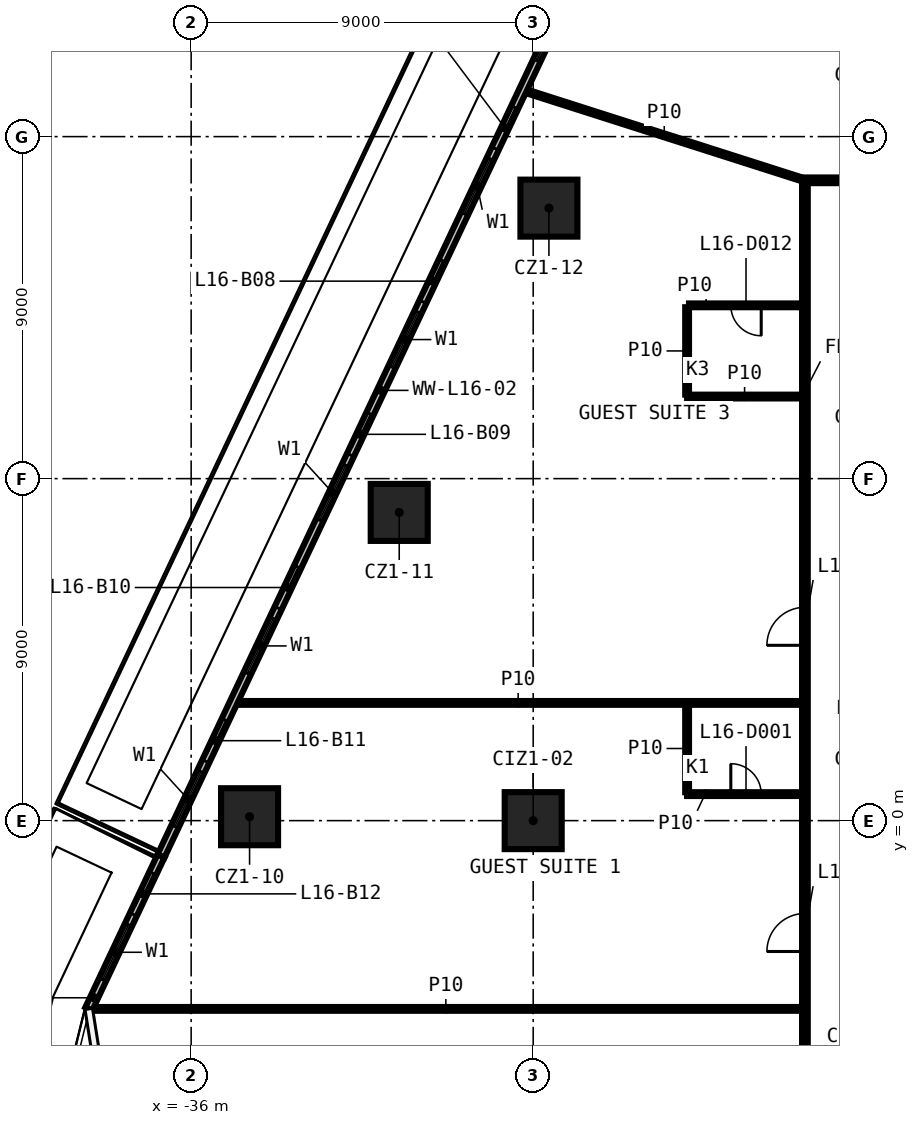
"""IFC4 building model, lengths in metres.
Left out: names, types, materials, properties, quantities, classifications, styles, units other than length and angle.
Written with IfcOpenShell. Run it as: python <this file> out.ifc"""

import sys

from ifc_helpers import new_model, si_unit, direction, frame, frame_2d, origin, origin_2d, place, context, subcontext, project, spatial, rectangle, extrude, element, fill, save


model = new_model("IFC4")
c1 = context("Model", 3, precision=1e-05, world=origin(), true_north=direction((0.0, 1.0)))
c2 = subcontext(c1, "Body", "Model", "MODEL_VIEW")
j1 = project(units=[si_unit("LENGTHUNIT", "METRE"), si_unit("PLANEANGLEUNIT", "RADIAN")], contexts=[c1])
p1 = place(None, origin())
s1 = spatial("IfcSite", under=j1, at=p1, CompositionType="ELEMENT")
p2 = place(p1, origin())
s2 = spatial("IfcBuilding", under=s1, at=p2, CompositionType="ELEMENT")
p3 = place(p2, frame((0.0, 0.0, 81.0)))
s3 = spatial("IfcBuildingStorey", under=s2, at=p3, CompositionType="ELEMENT", Elevation=81.0)
for number, where, z_axis, x_axis in (
    (1, (-34.463, 0.103, 0.0), (0.0, 0.0, 1.0), (1.0, 0.0, 0.0)),
    (2, (-30.525, 8.111, 0.0), (0.0, 0.0, 1.0), (1.0, 0.0, 0.0)),
    (3, (-26.586, 16.118, 0.0), (0.0, 0.0, 1.0), (1.0, 0.0, 0.0)),
    (4, (-27.0, 0.0, 0.0), (0.0, 0.0, 1.0), (1.0, 0.0, 0.0)),
):
    element("IfcColumn", number, at=place(p3, frame(where, z_axis=z_axis, x_axis=x_axis)), inside=s3, PredefinedType="COLUMN", context=c2, shape_type="SweptSolid", body=[
        extrude(rectangle(XDim=1.5, YDim=1.5, at=origin_2d()), origin(), (0.0, 0.0, 1.0), 3.3),
    ])
p4 = place(p3, frame((-38.672, -4.954, 0.0), z_axis=(0.0, 0.0, 1.0), x_axis=(1.0, 0.0, 0.0)))
e5 = element("IfcWall", 5, at=p4, inside=s3, PredefinedType="PARTITIONING", context=c2, shape_type="SweptSolid", body=[
    extrude(rectangle(XDim=18.747, YDim=0.1, at=frame_2d((9.374, 0.0))), origin(), (0.0, 0.0, 1.0), 3.3),
])
p5 = place(p3, frame((-22.95, 0.698, 0.0), z_axis=(0.0, 0.0, 1.0), x_axis=(1.0, 0.0, 0.0)))
e6 = element("IfcWall", 6, at=p5, inside=s3, PredefinedType="PARTITIONING", context=c2, shape_type="SweptSolid", body=[
    extrude(rectangle(XDim=3.025, YDim=0.1, at=frame_2d((1.512, 0.0))), origin(), (0.0, 0.0, 1.0), 3.3),
])
p6 = place(p5, frame((1.15, 0.0, 0.0)))
e7 = element("IfcOpeningElement", 7, at=p6, cuts=e6, PredefinedType="OPENING", context=c2, shape_type="SweptSolid", body=[
    extrude(rectangle(XDim=0.8, YDim=2.1, at=frame_2d((0.4, 1.05))), frame((0.0, 0.06, 0.0), z_axis=(0.0, -1.0, 0.0), x_axis=(1.0, 0.0, 0.0)), (0.0, 0.0, 1.0), 0.12),
])
p7 = place(p3, frame((-34.868, 3.098, 0.0), z_axis=(0.0, 0.0, 1.0), x_axis=(1.0, 0.0, 0.0)))
e8 = element("IfcWall", 8, at=p7, inside=s3, PredefinedType="PARTITIONING", context=c2, shape_type="SweptSolid", body=[
    extrude(rectangle(XDim=14.943, YDim=0.1, at=frame_2d((7.471, 0.0))), origin(), (0.0, 0.0, 1.0), 3.3),
])
p8 = place(p3, frame((-22.95, 11.16, 0.0), z_axis=(0.0, 0.0, 1.0), x_axis=(1.0, 0.0, 0.0)))
e9 = element("IfcWall", 9, at=p8, inside=s3, PredefinedType="PARTITIONING", context=c2, shape_type="SweptSolid", body=[
    extrude(rectangle(XDim=3.025, YDim=0.1, at=frame_2d((1.512, 0.0))), origin(), (0.0, 0.0, 1.0), 3.3),
])
p9 = place(p3, frame((-19.925, 13.56, 0.0), z_axis=(0.0, 0.0, 1.0), x_axis=(-1.0, 0.0, 0.0)))
e10 = element("IfcWall", 10, at=p9, inside=s3, PredefinedType="PARTITIONING", context=c2, shape_type="SweptSolid", body=[
    extrude(rectangle(XDim=2.975, YDim=0.1, at=frame_2d((1.487, 0.0))), origin(), (0.0, 0.0, 1.0), 3.3),
])
p10 = place(p9, frame((1.075, 0.0, 0.0)))
e11 = element("IfcOpeningElement", 11, at=p10, cuts=e10, PredefinedType="OPENING", context=c2, shape_type="SweptSolid", body=[
    extrude(rectangle(XDim=0.8, YDim=2.1, at=frame_2d((0.4, 1.05))), frame((0.0, 0.06, 0.0), z_axis=(0.0, -1.0, 0.0), x_axis=(1.0, 0.0, 0.0)), (0.0, 0.0, 1.0), 0.12),
])
p11 = place(p3, frame((-19.925, 16.85, 0.0), z_axis=(0.0, 0.0, 1.0), x_axis=(1.0, 0.0, 0.0)))
e12 = element("IfcWall", 12, at=p11, inside=s3, PredefinedType="PARTITIONING", context=c2, shape_type="SweptSolid", body=[
    extrude(rectangle(XDim=39.85, YDim=0.15, at=frame_2d((19.925, 0.0))), origin(), (0.0, 0.0, 1.0), 3.3),
])
p12 = place(p11, frame((31.667, 0.0, 0.0)))
e13 = element("IfcOpeningElement", 13, at=p12, cuts=e12, PredefinedType="OPENING", context=c2, shape_type="SweptSolid", body=[
    extrude(rectangle(XDim=0.9, YDim=2.1, at=frame_2d((0.45, 1.05))), frame((0.0, 0.085, 0.0), z_axis=(0.0, -1.0, 0.0), x_axis=(1.0, 0.0, 0.0)), (0.0, 0.0, 1.0), 0.17),
])
p13 = place(p11, frame((13.656, 0.0, 0.0)))
e14 = element("IfcOpeningElement", 14, at=p13, cuts=e12, PredefinedType="OPENING", context=c2, shape_type="SweptSolid", body=[
    extrude(rectangle(XDim=0.9, YDim=2.1, at=frame_2d((0.45, 1.05))), frame((0.0, 0.085, 0.0), z_axis=(0.0, -1.0, 0.0), x_axis=(1.0, 0.0, 0.0)), (0.0, 0.0, 1.0), 0.17),
])
p14 = place(p3, frame((-19.85, -16.775, 0.0), z_axis=(0.0, 0.0, 1.0), x_axis=(0.0, 1.0, 0.0)))
e15 = element("IfcWall", 15, at=p14, inside=s3, PredefinedType="PARTITIONING", context=c2, shape_type="SweptSolid", body=[
    extrude(rectangle(XDim=33.55, YDim=0.15, at=frame_2d((16.775, 0.0))), origin(), (0.0, 0.0, 1.0), 3.3),
])
p15 = place(p14, frame((13.332, 0.0, 0.0)))
e16 = element("IfcOpeningElement", 16, at=p15, cuts=e15, PredefinedType="OPENING", context=c2, shape_type="SweptSolid", body=[
    extrude(rectangle(XDim=1.0, YDim=2.1, at=frame_2d((0.5, 1.05))), frame((0.0, 0.085, 0.0), z_axis=(0.0, -1.0, 0.0), x_axis=(1.0, 0.0, 0.0)), (0.0, 0.0, 1.0), 0.17),
])
p16 = place(p14, frame((4.207, 0.0, 0.0)))
e17 = element("IfcOpeningElement", 17, at=p16, cuts=e15, PredefinedType="OPENING", context=c2, shape_type="SweptSolid", body=[
    extrude(rectangle(XDim=0.9, YDim=2.1, at=frame_2d((0.45, 1.05))), frame((0.0, 0.085, 0.0), z_axis=(0.0, -1.0, 0.0), x_axis=(1.0, 0.0, 0.0)), (0.0, 0.0, 1.0), 0.17),
])
p17 = place(p14, frame((21.389, 0.0, 0.0)))
e18 = element("IfcOpeningElement", 18, at=p17, cuts=e15, PredefinedType="OPENING", context=c2, shape_type="SweptSolid", body=[
    extrude(rectangle(XDim=1.0, YDim=2.1, at=frame_2d((0.5, 1.05))), frame((0.0, 0.085, 0.0), z_axis=(0.0, -1.0, 0.0), x_axis=(1.0, 0.0, 0.0)), (0.0, 0.0, 1.0), 0.17),
])
p18 = place(p3, frame((-22.95, 0.748, 0.0), z_axis=(0.0, 0.0, 1.0), x_axis=(0.0, 1.0, 0.0)))
e19 = element("IfcWall", 19, at=p18, inside=s3, PredefinedType="PARTITIONING", context=c2, shape_type="SweptSolid", body=[
    extrude(rectangle(XDim=2.3, YDim=0.1, at=frame_2d((1.15, 0.0))), origin(), (0.0, 0.0, 1.0), 3.3),
])
p19 = place(p3, frame((-22.95, 11.21, 0.0), z_axis=(0.0, 0.0, 1.0), x_axis=(0.0, 1.0, 0.0)))
e20 = element("IfcWall", 20, at=p19, inside=s3, PredefinedType="PARTITIONING", context=c2, shape_type="SweptSolid", body=[
    extrude(rectangle(XDim=2.3, YDim=0.1, at=frame_2d((1.15, 0.0))), origin(), (0.0, 0.0, 1.0), 3.3),
])
p20 = place(p3, frame((-27.253, 19.216, 0.0), z_axis=(0.0, 0.0, 1.0), x_axis=(0.952548805098, -0.304385896366, 0.0)))
e21 = element("IfcWall", 21, at=p20, inside=s3, PredefinedType="PARTITIONING", context=c2, shape_type="SweptSolid", body=[
    extrude(rectangle(XDim=7.772, YDim=0.1, at=frame_2d((3.886, 0.0))), origin(), (0.0, 0.0, 1.0), 3.3),
])
p21 = place(p3, frame((-25.368, 23.253, 0.0), z_axis=(0.0, 0.0, 1.0), x_axis=(-0.427150376431, -0.90418059917, 0.0)))
e22 = element("IfcWall", 22, at=p21, inside=s3, PredefinedType="SOLIDWALL", context=c2, shape_type="SweptSolid", body=[
    extrude(rectangle(XDim=26.749, YDim=0.2, at=frame_2d((13.375, 0.0))), origin(), (0.0, 0.0, 1.0), 3.3),
])
p22 = place(p21, frame((2.0, 0.0, 0.6)))
e23 = element("IfcOpeningElement", 23, at=p22, cuts=e22, PredefinedType="OPENING", context=c2, shape_type="SweptSolid", body=[
    extrude(rectangle(XDim=1.6, YDim=2.4, at=frame_2d((0.8, 1.2))), frame((0.0, 0.11, 0.0), z_axis=(0.0, -1.0, 0.0), x_axis=(1.0, 0.0, 0.0)), (0.0, 0.0, 1.0), 0.22),
])
p23 = place(p21, frame((0.5, 0.0, 0.0)))
e24 = element("IfcOpeningElement", 24, at=p23, cuts=e22, PredefinedType="OPENING", context=c2, shape_type="SweptSolid", body=[
    extrude(rectangle(XDim=1.2, YDim=2.4, at=frame_2d((0.6, 1.2))), frame((0.0, 0.11, 0.0), z_axis=(0.0, -1.0, 0.0), x_axis=(1.0, 0.0, 0.0)), (0.0, 0.0, 1.0), 0.22),
])
p24 = place(p21, frame((6.458, 0.0, 0.6)))
e25 = element("IfcOpeningElement", 25, at=p24, cuts=e22, PredefinedType="OPENING", context=c2, shape_type="SweptSolid", body=[
    extrude(rectangle(XDim=1.6, YDim=2.4, at=frame_2d((0.8, 1.2))), frame((0.0, 0.11, 0.0), z_axis=(0.0, -1.0, 0.0), x_axis=(1.0, 0.0, 0.0)), (0.0, 0.0, 1.0), 0.22),
])
p25 = place(p21, frame((4.958, 0.0, 0.0)))
e26 = element("IfcOpeningElement", 26, at=p25, cuts=e22, PredefinedType="OPENING", context=c2, shape_type="SweptSolid", body=[
    extrude(rectangle(XDim=1.2, YDim=2.4, at=frame_2d((0.6, 1.2))), frame((0.0, 0.11, 0.0), z_axis=(0.0, -1.0, 0.0), x_axis=(1.0, 0.0, 0.0)), (0.0, 0.0, 1.0), 0.22),
])
p26 = place(p21, frame((10.916, 0.0, 0.6)))
e27 = element("IfcOpeningElement", 27, at=p26, cuts=e22, PredefinedType="OPENING", context=c2, shape_type="SweptSolid", body=[
    extrude(rectangle(XDim=1.6, YDim=2.4, at=frame_2d((0.8, 1.2))), frame((0.0, 0.11, 0.0), z_axis=(0.0, -1.0, 0.0), x_axis=(1.0, 0.0, 0.0)), (0.0, 0.0, 1.0), 0.22),
])
p27 = place(p21, frame((9.416, 0.0, 0.0)))
e28 = element("IfcOpeningElement", 28, at=p27, cuts=e22, PredefinedType="OPENING", context=c2, shape_type="SweptSolid", body=[
    extrude(rectangle(XDim=1.2, YDim=2.4, at=frame_2d((0.6, 1.2))), frame((0.0, 0.11, 0.0), z_axis=(0.0, -1.0, 0.0), x_axis=(1.0, 0.0, 0.0)), (0.0, 0.0, 1.0), 0.22),
])
p28 = place(p21, frame((15.374, 0.0, 0.6)))
e29 = element("IfcOpeningElement", 29, at=p28, cuts=e22, PredefinedType="OPENING", context=c2, shape_type="SweptSolid", body=[
    extrude(rectangle(XDim=1.6, YDim=2.4, at=frame_2d((0.8, 1.2))), frame((0.0, 0.11, 0.0), z_axis=(0.0, -1.0, 0.0), x_axis=(1.0, 0.0, 0.0)), (0.0, 0.0, 1.0), 0.22),
])
p29 = place(p21, frame((13.874, 0.0, 0.0)))
e30 = element("IfcOpeningElement", 30, at=p29, cuts=e22, PredefinedType="OPENING", context=c2, shape_type="SweptSolid", body=[
    extrude(rectangle(XDim=1.2, YDim=2.4, at=frame_2d((0.6, 1.2))), frame((0.0, 0.11, 0.0), z_axis=(0.0, -1.0, 0.0), x_axis=(1.0, 0.0, 0.0)), (0.0, 0.0, 1.0), 0.22),
])
p30 = place(p21, frame((19.833, 0.0, 0.6)))
e31 = element("IfcOpeningElement", 31, at=p30, cuts=e22, PredefinedType="OPENING", context=c2, shape_type="SweptSolid", body=[
    extrude(rectangle(XDim=1.6, YDim=2.4, at=frame_2d((0.8, 1.2))), frame((0.0, 0.11, 0.0), z_axis=(0.0, -1.0, 0.0), x_axis=(1.0, 0.0, 0.0)), (0.0, 0.0, 1.0), 0.22),
])
p31 = place(p21, frame((18.333, 0.0, 0.0)))
e32 = element("IfcOpeningElement", 32, at=p31, cuts=e22, PredefinedType="OPENING", context=c2, shape_type="SweptSolid", body=[
    extrude(rectangle(XDim=1.2, YDim=2.4, at=frame_2d((0.6, 1.2))), frame((0.0, 0.11, 0.0), z_axis=(0.0, -1.0, 0.0), x_axis=(1.0, 0.0, 0.0)), (0.0, 0.0, 1.0), 0.22),
])
p32 = place(p21, frame((24.291, 0.0, 0.6)))
e33 = element("IfcOpeningElement", 33, at=p32, cuts=e22, PredefinedType="OPENING", context=c2, shape_type="SweptSolid", body=[
    extrude(rectangle(XDim=1.6, YDim=2.4, at=frame_2d((0.8, 1.2))), frame((0.0, 0.11, 0.0), z_axis=(0.0, -1.0, 0.0), x_axis=(1.0, 0.0, 0.0)), (0.0, 0.0, 1.0), 0.22),
])
p33 = place(p21, frame((22.791, 0.0, 0.0)))
e34 = element("IfcOpeningElement", 34, at=p33, cuts=e22, PredefinedType="OPENING", context=c2, shape_type="SweptSolid", body=[
    extrude(rectangle(XDim=1.2, YDim=2.4, at=frame_2d((0.6, 1.2))), frame((0.0, 0.11, 0.0), z_axis=(0.0, -1.0, 0.0), x_axis=(1.0, 0.0, 0.0)), (0.0, 0.0, 1.0), 0.22),
])
p34 = place(p3, frame((-36.794, -0.933, 0.0), z_axis=(0.0, 0.0, 1.0), x_axis=(-0.427189555154, -0.904162089433, 0.0)))
e35 = element("IfcWall", 35, at=p34, inside=s3, PredefinedType="SOLIDWALL", context=c2, shape_type="SweptSolid", body=[
    extrude(rectangle(XDim=4.448, YDim=0.2, at=frame_2d((2.224, 0.0))), origin(), (0.0, 0.0, 1.0), 3.3),
])
p35 = place(p34, frame((2.0, 0.0, 0.6)))
e36 = element("IfcOpeningElement", 36, at=p35, cuts=e35, PredefinedType="OPENING", context=c2, shape_type="SweptSolid", body=[
    extrude(rectangle(XDim=1.6, YDim=2.4, at=frame_2d((0.8, 1.2))), frame((0.0, 0.11, 0.0), z_axis=(0.0, -1.0, 0.0), x_axis=(1.0, 0.0, 0.0)), (0.0, 0.0, 1.0), 0.22),
])
p36 = place(p34, frame((0.5, 0.0, 0.0)))
e37 = element("IfcOpeningElement", 37, at=p36, cuts=e35, PredefinedType="OPENING", context=c2, shape_type="SweptSolid", body=[
    extrude(rectangle(XDim=1.2, YDim=2.4, at=frame_2d((0.6, 1.2))), frame((0.0, 0.11, 0.0), z_axis=(0.0, -1.0, 0.0), x_axis=(1.0, 0.0, 0.0)), (0.0, 0.0, 1.0), 0.22),
])
p37 = place(p6, origin())
e38 = element("IfcDoor", 38, at=p37, inside=s3, OperationType="SINGLE_SWING_LEFT", PredefinedType="DOOR", context=c2, shape_type="SweptSolid", body=[
    extrude(rectangle(XDim=0.8, YDim=2.1, at=frame_2d((0.4, 1.05))), frame((0.0, 0.025, 0.0), z_axis=(0.0, -1.0, 0.0), x_axis=(1.0, 0.0, 0.0)), (0.0, 0.0, 1.0), 0.05),
])
fill(e7, e38)
p38 = place(p15, origin())
e39 = element("IfcDoor", 39, at=p38, inside=s3, OperationType="SINGLE_SWING_RIGHT", PredefinedType="DOOR", context=c2, shape_type="SweptSolid", body=[
    extrude(rectangle(XDim=1.0, YDim=2.1, at=frame_2d((0.5, 1.05))), frame((0.0, 0.025, 0.0), z_axis=(0.0, -1.0, 0.0), x_axis=(1.0, 0.0, 0.0)), (0.0, 0.0, 1.0), 0.05),
])
fill(e16, e39)
p39 = place(p10, origin())
e40 = element("IfcDoor", 40, at=p39, inside=s3, OperationType="SINGLE_SWING_RIGHT", PredefinedType="DOOR", context=c2, shape_type="SweptSolid", body=[
    extrude(rectangle(XDim=0.8, YDim=2.1, at=frame_2d((0.4, 1.05))), frame((0.0, 0.025, 0.0), z_axis=(0.0, -1.0, 0.0), x_axis=(1.0, 0.0, 0.0)), (0.0, 0.0, 1.0), 0.05),
])
fill(e11, e40)
p40 = place(p17, origin())
e41 = element("IfcDoor", 41, at=p40, inside=s3, OperationType="SINGLE_SWING_LEFT", PredefinedType="DOOR", context=c2, shape_type="SweptSolid", body=[
    extrude(rectangle(XDim=1.0, YDim=2.1, at=frame_2d((0.5, 1.05))), frame((0.0, 0.025, 0.0), z_axis=(0.0, -1.0, 0.0), x_axis=(1.0, 0.0, 0.0)), (0.0, 0.0, 1.0), 0.05),
])
fill(e18, e41)
p41 = place(p22, origin())
e42 = element("IfcWindow", 42, at=p41, inside=s3, PartitioningType="SINGLE_PANEL", PredefinedType="WINDOW", context=c2, shape_type="SweptSolid", body=[
    extrude(rectangle(XDim=1.6, YDim=2.4, at=frame_2d((0.8, 1.2))), frame((0.0, 0.03, 0.0), z_axis=(0.0, -1.0, 0.0), x_axis=(1.0, 0.0, 0.0)), (0.0, 0.0, 1.0), 0.06),
])
fill(e23, e42)
p42 = place(p24, origin())
e43 = element("IfcWindow", 43, at=p42, inside=s3, PartitioningType="SINGLE_PANEL", PredefinedType="WINDOW", context=c2, shape_type="SweptSolid", body=[
    extrude(rectangle(XDim=1.6, YDim=2.4, at=frame_2d((0.8, 1.2))), frame((0.0, 0.03, 0.0), z_axis=(0.0, -1.0, 0.0), x_axis=(1.0, 0.0, 0.0)), (0.0, 0.0, 1.0), 0.06),
])
fill(e25, e43)
p43 = place(p25, origin())
e44 = element("IfcDoor", 44, at=p43, inside=s3, OperationType="SLIDING_TO_LEFT", PredefinedType="DOOR", context=c2, shape_type="SweptSolid", body=[
    extrude(rectangle(XDim=1.2, YDim=2.4, at=frame_2d((0.6, 1.2))), frame((0.0, 0.025, 0.0), z_axis=(0.0, -1.0, 0.0), x_axis=(1.0, 0.0, 0.0)), (0.0, 0.0, 1.0), 0.05),
])
fill(e26, e44)
p44 = place(p26, origin())
e45 = element("IfcWindow", 45, at=p44, inside=s3, PartitioningType="SINGLE_PANEL", PredefinedType="WINDOW", context=c2, shape_type="SweptSolid", body=[
    extrude(rectangle(XDim=1.6, YDim=2.4, at=frame_2d((0.8, 1.2))), frame((0.0, 0.03, 0.0), z_axis=(0.0, -1.0, 0.0), x_axis=(1.0, 0.0, 0.0)), (0.0, 0.0, 1.0), 0.06),
])
fill(e27, e45)
p45 = place(p27, origin())
e46 = element("IfcDoor", 46, at=p45, inside=s3, OperationType="SLIDING_TO_LEFT", PredefinedType="DOOR", context=c2, shape_type="SweptSolid", body=[
    extrude(rectangle(XDim=1.2, YDim=2.4, at=frame_2d((0.6, 1.2))), frame((0.0, 0.025, 0.0), z_axis=(0.0, -1.0, 0.0), x_axis=(1.0, 0.0, 0.0)), (0.0, 0.0, 1.0), 0.05),
])
fill(e28, e46)
p46 = place(p28, origin())
e47 = element("IfcWindow", 47, at=p46, inside=s3, PartitioningType="SINGLE_PANEL", PredefinedType="WINDOW", context=c2, shape_type="SweptSolid", body=[
    extrude(rectangle(XDim=1.6, YDim=2.4, at=frame_2d((0.8, 1.2))), frame((0.0, 0.03, 0.0), z_axis=(0.0, -1.0, 0.0), x_axis=(1.0, 0.0, 0.0)), (0.0, 0.0, 1.0), 0.06),
])
fill(e29, e47)
p47 = place(p29, origin())
e48 = element("IfcDoor", 48, at=p47, inside=s3, OperationType="SLIDING_TO_LEFT", PredefinedType="DOOR", context=c2, shape_type="SweptSolid", body=[
    extrude(rectangle(XDim=1.2, YDim=2.4, at=frame_2d((0.6, 1.2))), frame((0.0, 0.025, 0.0), z_axis=(0.0, -1.0, 0.0), x_axis=(1.0, 0.0, 0.0)), (0.0, 0.0, 1.0), 0.05),
])
fill(e30, e48)
p48 = place(p30, origin())
e49 = element("IfcWindow", 49, at=p48, inside=s3, PartitioningType="SINGLE_PANEL", PredefinedType="WINDOW", context=c2, shape_type="SweptSolid", body=[
    extrude(rectangle(XDim=1.6, YDim=2.4, at=frame_2d((0.8, 1.2))), frame((0.0, 0.03, 0.0), z_axis=(0.0, -1.0, 0.0), x_axis=(1.0, 0.0, 0.0)), (0.0, 0.0, 1.0), 0.06),
])
fill(e31, e49)
p49 = place(p31, origin())
e50 = element("IfcDoor", 50, at=p49, inside=s3, OperationType="SLIDING_TO_LEFT", PredefinedType="DOOR", context=c2, shape_type="SweptSolid", body=[
    extrude(rectangle(XDim=1.2, YDim=2.4, at=frame_2d((0.6, 1.2))), frame((0.0, 0.025, 0.0), z_axis=(0.0, -1.0, 0.0), x_axis=(1.0, 0.0, 0.0)), (0.0, 0.0, 1.0), 0.05),
])
fill(e32, e50)
p50 = place(p32, origin())
e51 = element("IfcWindow", 51, at=p50, inside=s3, PartitioningType="SINGLE_PANEL", PredefinedType="WINDOW", context=c2, shape_type="SweptSolid", body=[
    extrude(rectangle(XDim=1.6, YDim=2.4, at=frame_2d((0.8, 1.2))), frame((0.0, 0.03, 0.0), z_axis=(0.0, -1.0, 0.0), x_axis=(1.0, 0.0, 0.0)), (0.0, 0.0, 1.0), 0.06),
])
fill(e33, e51)
p51 = place(p33, origin())
e52 = element("IfcDoor", 52, at=p51, inside=s3, OperationType="SLIDING_TO_LEFT", PredefinedType="DOOR", context=c2, shape_type="SweptSolid", body=[
    extrude(rectangle(XDim=1.2, YDim=2.4, at=frame_2d((0.6, 1.2))), frame((0.0, 0.025, 0.0), z_axis=(0.0, -1.0, 0.0), x_axis=(1.0, 0.0, 0.0)), (0.0, 0.0, 1.0), 0.05),
])
fill(e34, e52)
p52 = place(p35, origin())
e53 = element("IfcWindow", 53, at=p52, inside=s3, PartitioningType="SINGLE_PANEL", PredefinedType="WINDOW", context=c2, shape_type="SweptSolid", body=[
    extrude(rectangle(XDim=1.6, YDim=2.4, at=frame_2d((0.8, 1.2))), frame((0.0, 0.03, 0.0), z_axis=(0.0, -1.0, 0.0), x_axis=(1.0, 0.0, 0.0)), (0.0, 0.0, 1.0), 0.06),
])
fill(e36, e53)
p53 = place(p36, origin())
e54 = element("IfcDoor", 54, at=p53, inside=s3, OperationType="SLIDING_TO_LEFT", PredefinedType="DOOR", context=c2, shape_type="SweptSolid", body=[
    extrude(rectangle(XDim=1.2, YDim=2.4, at=frame_2d((0.6, 1.2))), frame((0.0, 0.025, 0.0), z_axis=(0.0, -1.0, 0.0), x_axis=(1.0, 0.0, 0.0)), (0.0, 0.0, 1.0), 0.05),
])
fill(e37, e54)
save(model, sys.argv[1])
